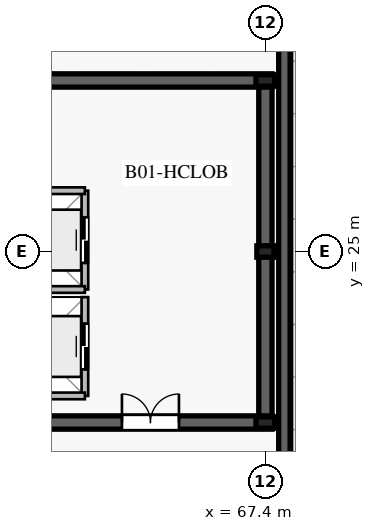
"""IFC4 building model, lengths in metres.
Left out: names, types, materials, properties, quantities, classifications, styles, units other than length and angle.
Written with IfcOpenShell. Run it as: python <this file> out.ifc"""

import sys

from ifc_helpers import new_model, si_unit, direction, frame, frame_2d, origin, origin_2d, place, context, subcontext, project, spatial, rectangle, i_section, extrude, element, fill, save


model = new_model("IFC4")
c1 = context("Model", 3, precision=1e-05, world=origin(), true_north=direction((0.0, 1.0)))
c2 = subcontext(c1, "Body", "Model", "MODEL_VIEW")
j1 = project(units=[si_unit("LENGTHUNIT", "METRE"), si_unit("PLANEANGLEUNIT", "RADIAN")], contexts=[c1])
p1 = place(None, origin())
s1 = spatial("IfcSite", under=j1, at=p1, CompositionType="ELEMENT")
p2 = place(p1, origin())
s2 = spatial("IfcBuilding", under=s1, at=p2, CompositionType="ELEMENT")
p3 = place(p2, frame((0.0, 0.0, -4.2)))
s3 = spatial("IfcBuildingStorey", under=s2, at=p3, CompositionType="ELEMENT", Elevation=-4.2)
p4 = place(p3, frame((67.9, 10.5, 0.0), z_axis=(0.0, 0.0, 1.0), x_axis=(0.0, 1.0, 0.0)))
e1 = element("IfcWall", 1, at=p4, inside=s3, PredefinedType="SOLIDWALL", context=c2, shape_type="SweptSolid", body=[
    extrude(rectangle(XDim=28.5, YDim=0.3, at=frame_2d((14.25, 0.0))), origin(), (0.0, 0.0, 1.0), 3.88),
])
p5 = place(p3, frame((59.425, 20.5, 0.0), z_axis=(0.0, 0.0, 1.0), x_axis=(1.0, 0.0, 0.0)))
e2 = element("IfcWall", 2, at=p5, inside=s3, PredefinedType="SHEAR", context=c2, shape_type="SweptSolid", body=[
    extrude(rectangle(XDim=8.15, YDim=0.35, at=frame_2d((4.075, 0.0))), origin(), (0.0, 0.0, 1.0), 3.88),
])
p6 = place(p5, frame((4.2, 0.0, 0.0)))
e3 = element("IfcOpeningElement", 3, at=p6, cuts=e2, PredefinedType="OPENING", context=c2, shape_type="SweptSolid", body=[
    extrude(rectangle(XDim=1.5, YDim=2.2, at=frame_2d((0.75, 1.1))), frame((0.0, 0.185, 0.0), z_axis=(0.0, -1.0, 0.0), x_axis=(1.0, 0.0, 0.0)), (0.0, 0.0, 1.0), 0.37),
])
p7 = place(p3, frame((67.575, 29.5, 0.0), z_axis=(0.0, 0.0, 1.0), x_axis=(-1.0, 0.0, 0.0)))
e4 = element("IfcWall", 4, at=p7, inside=s3, PredefinedType="SHEAR", context=c2, shape_type="SweptSolid", body=[
    extrude(rectangle(XDim=8.15, YDim=0.35, at=frame_2d((4.075, 0.0))), origin(), (0.0, 0.0, 1.0), 3.88),
])
p8 = place(p3, frame((67.4, 20.675, 0.0), z_axis=(0.0, 0.0, 1.0), x_axis=(0.0, 1.0, 0.0)))
e5 = element("IfcWall", 5, at=p8, inside=s3, PredefinedType="SHEAR", context=c2, shape_type="SweptSolid", body=[
    extrude(rectangle(XDim=8.65, YDim=0.35, at=frame_2d((4.325, 0.0))), origin(), (0.0, 0.0, 1.0), 3.88),
])
for number, where, z_axis, x_axis in (
    (6, (67.4, 20.5, 0.0), (0.0, 0.0, 1.0), (1.0, 0.0, 0.0)),
    (7, (67.4, 29.5, 0.0), (0.0, 0.0, 1.0), (1.0, 0.0, 0.0)),
):
    element("IfcColumn", number, at=place(p3, frame(where, z_axis=z_axis, x_axis=x_axis)), inside=s3, PredefinedType="COLUMN", context=c2, shape_type="SweptSolid", body=[
        extrude(i_section(OverallWidth=0.3, OverallDepth=0.5, WebThickness=0.014, FlangeThickness=0.028, at=origin_2d()), origin(), (0.0, 0.0, 1.0), 4.2),
    ])
p9 = place(p3, frame((67.4, 25.0, 0.0), z_axis=(0.0, 0.0, 1.0), x_axis=(1.0, 0.0, 0.0)))
e8 = element("IfcColumn", 8, at=p9, inside=s3, PredefinedType="COLUMN", context=c2, shape_type="SweptSolid", body=[
    extrude(i_section(OverallWidth=0.3, OverallDepth=0.45, WebThickness=0.014, FlangeThickness=0.026, at=origin_2d()), origin(), (0.0, 0.0, 1.0), 4.2),
])
p10 = place(p3, frame((62.65, 21.2, 0.0), z_axis=(0.0, 0.0, 1.0), x_axis=(0.0, 1.0, 0.0)))
e9 = element("IfcWall", 9, at=p10, inside=s3, PredefinedType="PARTITIONING", context=c2, shape_type="SweptSolid", body=[
    extrude(rectangle(XDim=2.6, YDim=0.175, at=frame_2d((1.3, 0.0))), origin(), (0.0, 0.0, 1.0), 3.88),
])
p11 = place(p10, frame((0.7, 0.0, 0.0)))
e10 = element("IfcOpeningElement", 10, at=p11, cuts=e9, PredefinedType="OPENING", context=c2, shape_type="SweptSolid", body=[
    extrude(rectangle(XDim=1.2, YDim=2.2, at=frame_2d((0.6, 1.1))), frame((0.0, 0.098, 0.0), z_axis=(0.0, -1.0, 0.0), x_axis=(1.0, 0.0, 0.0)), (0.0, 0.0, 1.0), 0.195),
])
p12 = place(p3, frame((60.05, 21.2, 0.0), z_axis=(0.0, 0.0, 1.0), x_axis=(1.0, 0.0, 0.0)))
e11 = element("IfcWall", 11, at=p12, inside=s3, PredefinedType="PARTITIONING", context=c2, shape_type="SweptSolid", body=[
    extrude(rectangle(XDim=2.6, YDim=0.175, at=frame_2d((1.3, 0.0))), origin(), (0.0, 0.0, 1.0), 3.88),
])
p13 = place(p3, frame((62.65, 24.0, 0.0), z_axis=(0.0, 0.0, 1.0), x_axis=(0.0, 1.0, 0.0)))
e12 = element("IfcWall", 12, at=p13, inside=s3, PredefinedType="PARTITIONING", context=c2, shape_type="SweptSolid", body=[
    extrude(rectangle(XDim=2.6, YDim=0.175, at=frame_2d((1.3, 0.0))), origin(), (0.0, 0.0, 1.0), 3.52),
])
p14 = place(p13, frame((0.7, 0.0, 0.0)))
e13 = element("IfcOpeningElement", 13, at=p14, cuts=e12, PredefinedType="OPENING", context=c2, shape_type="SweptSolid", body=[
    extrude(rectangle(XDim=1.2, YDim=2.2, at=frame_2d((0.6, 1.1))), frame((0.0, 0.098, 0.0), z_axis=(0.0, -1.0, 0.0), x_axis=(1.0, 0.0, 0.0)), (0.0, 0.0, 1.0), 0.195),
])
for number, where, z_axis, x_axis in (
    (14, (60.05, 24.0, 0.0), (0.0, 0.0, 1.0), (1.0, 0.0, 0.0)),
    (15, (60.05, 26.6, 0.0), (0.0, 0.0, 1.0), (1.0, 0.0, 0.0)),
):
    element("IfcWall", number, at=place(p3, frame(where, z_axis=z_axis, x_axis=x_axis)), inside=s3, PredefinedType="PARTITIONING", context=c2, shape_type="SweptSolid", body=[
        extrude(rectangle(XDim=2.6, YDim=0.175, at=frame_2d((1.3, 0.0))), origin(), (0.0, 0.0, 1.0), 3.88),
    ])
p15 = place(p11, origin())
e16 = element("IfcDoor", 16, at=p15, inside=s3, OperationType="DOUBLE_DOOR_SLIDING", PredefinedType="DOOR", context=c2, shape_type="SweptSolid", body=[
    extrude(rectangle(XDim=1.2, YDim=2.2, at=frame_2d((0.6, 1.1))), frame((0.0, 0.025, 0.0), z_axis=(0.0, -1.0, 0.0), x_axis=(1.0, 0.0, 0.0)), (0.0, 0.0, 1.0), 0.05),
])
fill(e10, e16)
p16 = place(p14, origin())
e17 = element("IfcDoor", 17, at=p16, inside=s3, OperationType="DOUBLE_DOOR_SLIDING", PredefinedType="DOOR", context=c2, shape_type="SweptSolid", body=[
    extrude(rectangle(XDim=1.2, YDim=2.2, at=frame_2d((0.6, 1.1))), frame((0.0, 0.025, 0.0), z_axis=(0.0, -1.0, 0.0), x_axis=(1.0, 0.0, 0.0)), (0.0, 0.0, 1.0), 0.05),
])
fill(e13, e17)
p17 = place(p6, origin())
e18 = element("IfcDoor", 18, at=p17, inside=s3, OperationType="DOUBLE_DOOR_SINGLE_SWING", PredefinedType="DOOR", context=c2, shape_type="SweptSolid", body=[
    extrude(rectangle(XDim=1.5, YDim=2.2, at=frame_2d((0.75, 1.1))), frame((0.0, 0.025, 0.0), z_axis=(0.0, -1.0, 0.0), x_axis=(1.0, 0.0, 0.0)), (0.0, 0.0, 1.0), 0.05),
])
fill(e3, e18)
save(model, sys.argv[1])
